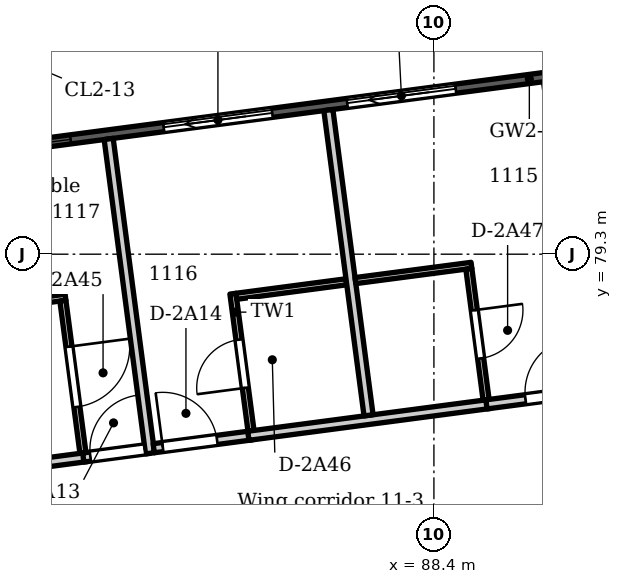
"""IFC4 building model, lengths in metres.
Left out: names, types, materials, properties, quantities, classifications, styles, units other than length and angle.
Written with IfcOpenShell. Run it as: python <this file> out.ifc"""

import sys

from ifc_helpers import new_model, si_unit, direction, frame, frame_2d, origin, place, context, subcontext, project, spatial, polyline, rectangle, outline, extrude, element, fill, save


model = new_model("IFC4")
c1 = context("Model", 3, precision=1e-05, world=origin(), true_north=direction((0.0, 1.0)))
c2 = subcontext(c1, "Body", "Model", "MODEL_VIEW")
j1 = project(units=[si_unit("LENGTHUNIT", "METRE"), si_unit("PLANEANGLEUNIT", "RADIAN")], contexts=[c1])
p1 = place(None, origin())
s1 = spatial("IfcSite", under=j1, at=p1, CompositionType="ELEMENT")
p2 = place(p1, origin())
s2 = spatial("IfcBuilding", under=s1, at=p2, CompositionType="ELEMENT")
p3 = place(p2, frame((0.0, 0.0, 50.4)))
s3 = spatial("IfcBuildingStorey", under=s2, at=p3, CompositionType="ELEMENT", Elevation=50.4)
p4 = place(p3, frame((54.142, 77.465, 0.0), z_axis=(0.0, 0.0, 1.0), x_axis=(0.991444696532, 0.130527444308, 0.0)))
e1 = element("IfcWall", 1, at=p4, inside=s3, PredefinedType="SOLIDWALL", context=c2, shape_type="SweptSolid", body=[
    extrude(outline(polyline([(0.149, 0.075), (0.149, -0.075), (47.217, -0.075), (47.217, 0.075), (0.149, 0.075)])), origin(), (0.0, 0.0, 1.0), 3.3),
])
p5 = place(p4, frame((1.222, 0.0, 0.0)))
e2 = element("IfcOpeningElement", 2, at=p5, cuts=e1, PredefinedType="OPENING", context=c2, shape_type="SweptSolid", body=[
    extrude(rectangle(XDim=1.8, YDim=2.6, at=frame_2d((0.9, 1.3))), frame((0.0, 0.085, 0.0), z_axis=(0.0, -1.0, 0.0), x_axis=(1.0, 0.0, 0.0)), (0.0, 0.0, 1.0), 0.17),
])
p6 = place(p4, frame((4.565, 0.0, 0.0)))
e3 = element("IfcOpeningElement", 3, at=p6, cuts=e1, PredefinedType="OPENING", context=c2, shape_type="SweptSolid", body=[
    extrude(rectangle(XDim=1.8, YDim=2.6, at=frame_2d((0.9, 1.3))), frame((0.0, 0.085, 0.0), z_axis=(0.0, -1.0, 0.0), x_axis=(1.0, 0.0, 0.0)), (0.0, 0.0, 1.0), 0.17),
])
p7 = place(p4, frame((8.209, 0.0, 0.0)))
e4 = element("IfcOpeningElement", 4, at=p7, cuts=e1, PredefinedType="OPENING", context=c2, shape_type="SweptSolid", body=[
    extrude(rectangle(XDim=1.8, YDim=2.6, at=frame_2d((0.9, 1.3))), frame((0.0, 0.085, 0.0), z_axis=(0.0, -1.0, 0.0), x_axis=(1.0, 0.0, 0.0)), (0.0, 0.0, 1.0), 0.17),
])
p8 = place(p4, frame((12.453, 0.0, 0.0)))
e5 = element("IfcOpeningElement", 5, at=p8, cuts=e1, PredefinedType="OPENING", context=c2, shape_type="SweptSolid", body=[
    extrude(rectangle(XDim=1.8, YDim=2.6, at=frame_2d((0.9, 1.3))), frame((0.0, 0.085, 0.0), z_axis=(0.0, -1.0, 0.0), x_axis=(1.0, 0.0, 0.0)), (0.0, 0.0, 1.0), 0.17),
])
p9 = place(p4, frame((15.496, 0.0, 0.0)))
e6 = element("IfcOpeningElement", 6, at=p9, cuts=e1, PredefinedType="OPENING", context=c2, shape_type="SweptSolid", body=[
    extrude(rectangle(XDim=1.8, YDim=2.6, at=frame_2d((0.9, 1.3))), frame((0.0, 0.085, 0.0), z_axis=(0.0, -1.0, 0.0), x_axis=(1.0, 0.0, 0.0)), (0.0, 0.0, 1.0), 0.17),
])
p10 = place(p4, frame((18.84, 0.0, 0.15)))
e7 = element("IfcOpeningElement", 7, at=p10, cuts=e1, PredefinedType="OPENING", context=c2, shape_type="SweptSolid", body=[
    extrude(rectangle(XDim=2.4, YDim=2.45, at=frame_2d((1.2, 1.225))), frame((0.0, 0.085, 0.0), z_axis=(0.0, -1.0, 0.0), x_axis=(1.0, 0.0, 0.0)), (0.0, 0.0, 1.0), 0.17),
])
p11 = place(p4, frame((22.783, 0.0, 0.0)))
e8 = element("IfcOpeningElement", 8, at=p11, cuts=e1, PredefinedType="OPENING", context=c2, shape_type="SweptSolid", body=[
    extrude(rectangle(XDim=1.8, YDim=2.6, at=frame_2d((0.9, 1.3))), frame((0.0, 0.085, 0.0), z_axis=(0.0, -1.0, 0.0), x_axis=(1.0, 0.0, 0.0)), (0.0, 0.0, 1.0), 0.17),
])
p12 = place(p4, frame((26.127, 0.0, 0.15)))
e9 = element("IfcOpeningElement", 9, at=p12, cuts=e1, PredefinedType="OPENING", context=c2, shape_type="SweptSolid", body=[
    extrude(rectangle(XDim=2.4, YDim=2.45, at=frame_2d((1.2, 1.225))), frame((0.0, 0.085, 0.0), z_axis=(0.0, -1.0, 0.0), x_axis=(1.0, 0.0, 0.0)), (0.0, 0.0, 1.0), 0.17),
])
p13 = place(p4, frame((30.071, 0.0, 0.0)))
e10 = element("IfcOpeningElement", 10, at=p13, cuts=e1, PredefinedType="OPENING", context=c2, shape_type="SweptSolid", body=[
    extrude(rectangle(XDim=1.8, YDim=2.6, at=frame_2d((0.9, 1.3))), frame((0.0, 0.085, 0.0), z_axis=(0.0, -1.0, 0.0), x_axis=(1.0, 0.0, 0.0)), (0.0, 0.0, 1.0), 0.17),
])
p14 = place(p4, frame((33.114, 0.0, 0.0)))
e11 = element("IfcOpeningElement", 11, at=p14, cuts=e1, PredefinedType="OPENING", context=c2, shape_type="SweptSolid", body=[
    extrude(rectangle(XDim=1.8, YDim=2.6, at=frame_2d((0.9, 1.3))), frame((0.0, 0.085, 0.0), z_axis=(0.0, -1.0, 0.0), x_axis=(1.0, 0.0, 0.0)), (0.0, 0.0, 1.0), 0.17),
])
p15 = place(p4, frame((37.358, 0.0, 0.0)))
e12 = element("IfcOpeningElement", 12, at=p15, cuts=e1, PredefinedType="OPENING", context=c2, shape_type="SweptSolid", body=[
    extrude(rectangle(XDim=1.8, YDim=2.6, at=frame_2d((0.9, 1.3))), frame((0.0, 0.085, 0.0), z_axis=(0.0, -1.0, 0.0), x_axis=(1.0, 0.0, 0.0)), (0.0, 0.0, 1.0), 0.17),
])
p16 = place(p4, frame((41.001, 0.0, 0.0)))
e13 = element("IfcOpeningElement", 13, at=p16, cuts=e1, PredefinedType="OPENING", context=c2, shape_type="SweptSolid", body=[
    extrude(rectangle(XDim=1.8, YDim=2.6, at=frame_2d((0.9, 1.3))), frame((0.0, 0.085, 0.0), z_axis=(0.0, -1.0, 0.0), x_axis=(1.0, 0.0, 0.0)), (0.0, 0.0, 1.0), 0.17),
])
p17 = place(p4, frame((44.345, 0.0, 0.0)))
e14 = element("IfcOpeningElement", 14, at=p17, cuts=e1, PredefinedType="OPENING", context=c2, shape_type="SweptSolid", body=[
    extrude(rectangle(XDim=1.8, YDim=2.6, at=frame_2d((0.9, 1.3))), frame((0.0, 0.085, 0.0), z_axis=(0.0, -1.0, 0.0), x_axis=(1.0, 0.0, 0.0)), (0.0, 0.0, 1.0), 0.17),
])
p18 = place(p3, frame((105.889, 77.411, 0.0), z_axis=(0.0, 0.0, 1.0), x_axis=(-0.38268395344, -0.923879316675, 0.0)))
e15 = element("IfcWall", 15, at=p18, inside=s3, PredefinedType="SOLIDWALL", context=c2, shape_type="SweptSolid", body=[
    extrude(outline(polyline([(0.149, 0.075), (0.149, -0.075), (47.217, -0.075), (47.217, 0.075), (0.149, 0.075)])), origin(), (0.0, 0.0, 1.0), 3.3),
])
p19 = place(p18, frame((1.222, 0.0, 0.0)))
e16 = element("IfcOpeningElement", 16, at=p19, cuts=e15, PredefinedType="OPENING", context=c2, shape_type="SweptSolid", body=[
    extrude(rectangle(XDim=1.8, YDim=2.6, at=frame_2d((0.9, 1.3))), frame((0.0, 0.085, 0.0), z_axis=(0.0, -1.0, 0.0), x_axis=(1.0, 0.0, 0.0)), (0.0, 0.0, 1.0), 0.17),
])
p20 = place(p18, frame((4.565, 0.0, 0.0)))
e17 = element("IfcOpeningElement", 17, at=p20, cuts=e15, PredefinedType="OPENING", context=c2, shape_type="SweptSolid", body=[
    extrude(rectangle(XDim=1.8, YDim=2.6, at=frame_2d((0.9, 1.3))), frame((0.0, 0.085, 0.0), z_axis=(0.0, -1.0, 0.0), x_axis=(1.0, 0.0, 0.0)), (0.0, 0.0, 1.0), 0.17),
])
p21 = place(p18, frame((8.209, 0.0, 0.0)))
e18 = element("IfcOpeningElement", 18, at=p21, cuts=e15, PredefinedType="OPENING", context=c2, shape_type="SweptSolid", body=[
    extrude(rectangle(XDim=1.8, YDim=2.6, at=frame_2d((0.9, 1.3))), frame((0.0, 0.085, 0.0), z_axis=(0.0, -1.0, 0.0), x_axis=(1.0, 0.0, 0.0)), (0.0, 0.0, 1.0), 0.17),
])
p22 = place(p18, frame((12.453, 0.0, 0.0)))
e19 = element("IfcOpeningElement", 19, at=p22, cuts=e15, PredefinedType="OPENING", context=c2, shape_type="SweptSolid", body=[
    extrude(rectangle(XDim=1.8, YDim=2.6, at=frame_2d((0.9, 1.3))), frame((0.0, 0.085, 0.0), z_axis=(0.0, -1.0, 0.0), x_axis=(1.0, 0.0, 0.0)), (0.0, 0.0, 1.0), 0.17),
])
p23 = place(p18, frame((15.496, 0.0, 0.0)))
e20 = element("IfcOpeningElement", 20, at=p23, cuts=e15, PredefinedType="OPENING", context=c2, shape_type="SweptSolid", body=[
    extrude(rectangle(XDim=1.8, YDim=2.6, at=frame_2d((0.9, 1.3))), frame((0.0, 0.085, 0.0), z_axis=(0.0, -1.0, 0.0), x_axis=(1.0, 0.0, 0.0)), (0.0, 0.0, 1.0), 0.17),
])
p24 = place(p18, frame((18.84, 0.0, 0.15)))
e21 = element("IfcOpeningElement", 21, at=p24, cuts=e15, PredefinedType="OPENING", context=c2, shape_type="SweptSolid", body=[
    extrude(rectangle(XDim=2.4, YDim=2.45, at=frame_2d((1.2, 1.225))), frame((0.0, 0.085, 0.0), z_axis=(0.0, -1.0, 0.0), x_axis=(1.0, 0.0, 0.0)), (0.0, 0.0, 1.0), 0.17),
])
p25 = place(p18, frame((22.783, 0.0, 0.0)))
e22 = element("IfcOpeningElement", 22, at=p25, cuts=e15, PredefinedType="OPENING", context=c2, shape_type="SweptSolid", body=[
    extrude(rectangle(XDim=1.8, YDim=2.6, at=frame_2d((0.9, 1.3))), frame((0.0, 0.085, 0.0), z_axis=(0.0, -1.0, 0.0), x_axis=(1.0, 0.0, 0.0)), (0.0, 0.0, 1.0), 0.17),
])
p26 = place(p18, frame((26.127, 0.0, 0.15)))
e23 = element("IfcOpeningElement", 23, at=p26, cuts=e15, PredefinedType="OPENING", context=c2, shape_type="SweptSolid", body=[
    extrude(rectangle(XDim=2.4, YDim=2.45, at=frame_2d((1.2, 1.225))), frame((0.0, 0.085, 0.0), z_axis=(0.0, -1.0, 0.0), x_axis=(1.0, 0.0, 0.0)), (0.0, 0.0, 1.0), 0.17),
])
p27 = place(p18, frame((30.071, 0.0, 0.0)))
e24 = element("IfcOpeningElement", 24, at=p27, cuts=e15, PredefinedType="OPENING", context=c2, shape_type="SweptSolid", body=[
    extrude(rectangle(XDim=1.8, YDim=2.6, at=frame_2d((0.9, 1.3))), frame((0.0, 0.085, 0.0), z_axis=(0.0, -1.0, 0.0), x_axis=(1.0, 0.0, 0.0)), (0.0, 0.0, 1.0), 0.17),
])
p28 = place(p18, frame((33.114, 0.0, 0.0)))
e25 = element("IfcOpeningElement", 25, at=p28, cuts=e15, PredefinedType="OPENING", context=c2, shape_type="SweptSolid", body=[
    extrude(rectangle(XDim=1.8, YDim=2.6, at=frame_2d((0.9, 1.3))), frame((0.0, 0.085, 0.0), z_axis=(0.0, -1.0, 0.0), x_axis=(1.0, 0.0, 0.0)), (0.0, 0.0, 1.0), 0.17),
])
p29 = place(p18, frame((37.358, 0.0, 0.0)))
e26 = element("IfcOpeningElement", 26, at=p29, cuts=e15, PredefinedType="OPENING", context=c2, shape_type="SweptSolid", body=[
    extrude(rectangle(XDim=1.8, YDim=2.6, at=frame_2d((0.9, 1.3))), frame((0.0, 0.085, 0.0), z_axis=(0.0, -1.0, 0.0), x_axis=(1.0, 0.0, 0.0)), (0.0, 0.0, 1.0), 0.17),
])
p30 = place(p18, frame((41.001, 0.0, 0.0)))
e27 = element("IfcOpeningElement", 27, at=p30, cuts=e15, PredefinedType="OPENING", context=c2, shape_type="SweptSolid", body=[
    extrude(rectangle(XDim=1.8, YDim=2.6, at=frame_2d((0.9, 1.3))), frame((0.0, 0.085, 0.0), z_axis=(0.0, -1.0, 0.0), x_axis=(1.0, 0.0, 0.0)), (0.0, 0.0, 1.0), 0.17),
])
p31 = place(p18, frame((44.345, 0.0, 0.0)))
e28 = element("IfcOpeningElement", 28, at=p31, cuts=e15, PredefinedType="OPENING", context=c2, shape_type="SweptSolid", body=[
    extrude(rectangle(XDim=1.8, YDim=2.6, at=frame_2d((0.9, 1.3))), frame((0.0, 0.085, 0.0), z_axis=(0.0, -1.0, 0.0), x_axis=(1.0, 0.0, 0.0)), (0.0, 0.0, 1.0), 0.17),
])
p32 = place(p3, frame((79.838, 78.262, 0.0), z_axis=(0.0, 0.0, 1.0), x_axis=(0.991430252683, 0.130637108298, 0.0)))
e29 = element("IfcWall", 29, at=p32, inside=s3, PredefinedType="PARTITIONING", context=c2, shape_type="SweptSolid", body=[
    extrude(rectangle(XDim=2.525, YDim=0.1, at=frame_2d((1.262, 0.0))), origin(), (0.0, 0.0, 1.0), 3.3),
])
p33 = place(p3, frame((80.106, 75.623, 0.0), z_axis=(0.0, 0.0, 1.0), x_axis=(0.991448878041, 0.130495678972, 0.0)))
e30 = element("IfcWall", 30, at=p33, inside=s3, PredefinedType="PARTITIONING", context=c2, shape_type="SweptSolid", body=[
    extrude(rectangle(XDim=2.608, YDim=0.15, at=frame_2d((1.304, 0.0))), origin(), (0.0, 0.0, 1.0), 3.3),
])
p34 = place(p3, frame((82.299, 78.535, 0.0), z_axis=(0.0, 0.0, 1.0), x_axis=(0.130504525485, -0.991447713613, 0.0)))
e31 = element("IfcWall", 31, at=p34, inside=s3, PredefinedType="PARTITIONING", context=c2, shape_type="SweptSolid", body=[
    extrude(rectangle(XDim=2.525, YDim=0.1, at=frame_2d((1.263, 0.0))), origin(), (0.0, 0.0, 1.0), 3.3),
])
p35 = place(p34, frame((0.763, 0.0, 0.0)))
e32 = element("IfcOpeningElement", 32, at=p35, cuts=e31, PredefinedType="OPENING", context=c2, shape_type="SweptSolid", body=[
    extrude(rectangle(XDim=1.0, YDim=2.1, at=frame_2d((0.5, 1.05))), frame((0.0, 0.06, 0.0), z_axis=(0.0, -1.0, 0.0), x_axis=(1.0, 0.0, 0.0)), (0.0, 0.0, 1.0), 0.12),
])
p36 = place(p3, frame((82.634, 75.956, 0.0), z_axis=(0.0, 0.0, 1.0), x_axis=(0.99141275319, 0.130769846721, 0.0)))
e33 = element("IfcWall", 33, at=p36, inside=s3, PredefinedType="PARTITIONING", context=c2, shape_type="SweptSolid", body=[
    extrude(rectangle(XDim=1.102, YDim=0.15, at=frame_2d((0.551, 0.0))), origin(), (0.0, 0.0, 1.0), 3.3),
])
p37 = place(p36, frame((0.117, 0.0, 0.0)))
e34 = element("IfcOpeningElement", 34, at=p37, cuts=e33, PredefinedType="OPENING", context=c2, shape_type="SweptSolid", body=[
    extrude(rectangle(XDim=0.9, YDim=2.1, at=frame_2d((0.45, 1.05))), frame((0.0, 0.085, 0.0), z_axis=(0.0, -1.0, 0.0), x_axis=(1.0, 0.0, 0.0)), (0.0, 0.0, 1.0), 0.17),
])
p38 = place(p3, frame((83.051, 81.195, 0.0), z_axis=(0.0, 0.0, 1.0), x_axis=(0.130492059077, -0.99144935449, 0.0)))
e35 = element("IfcWall", 35, at=p38, inside=s3, PredefinedType="PARTITIONING", context=c2, shape_type="SweptSolid", body=[
    extrude(rectangle(XDim=5.214, YDim=0.15, at=frame_2d((2.607, 0.0))), origin(), (0.0, 0.0, 1.0), 3.3),
])
p39 = place(p3, frame((83.792, 76.109, 0.0), z_axis=(0.0, 0.0, 1.0), x_axis=(0.991466035582, 0.130365257213, 0.0)))
e36 = element("IfcWall", 36, at=p39, inside=s3, PredefinedType="PARTITIONING", context=c2, shape_type="SweptSolid", body=[
    extrude(rectangle(XDim=1.627, YDim=0.15, at=frame_2d((0.814, 0.0))), origin(), (0.0, 0.0, 1.0), 3.3),
])
p40 = place(p39, frame((0.15, 0.0, 0.0)))
e37 = element("IfcOpeningElement", 37, at=p40, cuts=e36, PredefinedType="OPENING", context=c2, shape_type="SweptSolid", body=[
    extrude(rectangle(XDim=0.9, YDim=2.1, at=frame_2d((0.45, 1.05))), frame((0.0, 0.085, 0.0), z_axis=(0.0, -1.0, 0.0), x_axis=(1.0, 0.0, 0.0)), (0.0, 0.0, 1.0), 0.17),
])
p41 = place(p3, frame((85.094, 78.651, 0.0), z_axis=(0.0, 0.0, 1.0), x_axis=(0.13083486939, -0.991404174367, 0.0)))
e38 = element("IfcWall", 38, at=p41, inside=s3, PredefinedType="PARTITIONING", context=c2, shape_type="SweptSolid", body=[
    extrude(rectangle(XDim=2.275, YDim=0.1, at=frame_2d((1.137, 0.0))), origin(), (0.0, 0.0, 1.0), 3.3),
])
p42 = place(p41, frame((0.762, 0.0, 0.0)))
e39 = element("IfcOpeningElement", 39, at=p42, cuts=e38, PredefinedType="OPENING", context=c2, shape_type="SweptSolid", body=[
    extrude(rectangle(XDim=0.8, YDim=2.1, at=frame_2d((0.4, 1.05))), frame((0.0, 0.06, 0.0), z_axis=(0.0, -1.0, 0.0), x_axis=(1.0, 0.0, 0.0)), (0.0, 0.0, 1.0), 0.12),
])
p43 = place(p3, frame((85.151, 78.607, 0.0), z_axis=(0.0, 0.0, 1.0), x_axis=(0.991411458615, 0.130779660983, 0.0)))
e40 = element("IfcWall", 40, at=p43, inside=s3, PredefinedType="PARTITIONING", context=c2, shape_type="SweptSolid", body=[
    extrude(rectangle(XDim=1.826, YDim=0.1, at=frame_2d((0.913, 0.0))), origin(), (0.0, 0.0, 1.0), 3.3),
])
p44 = place(p3, frame((85.238, 74.409, 0.0), z_axis=(0.0, 0.0, 1.0), x_axis=(0.991440693098, 0.130557849512, 0.0)))
e41 = element("IfcWall", 41, at=p44, inside=s3, PredefinedType="PARTITIONING", context=c2, shape_type="SweptSolid", body=[
    extrude(rectangle(XDim=5.378, YDim=0.15, at=frame_2d((2.689, 0.0))), origin(), (0.0, 0.0, 1.0), 3.3),
])
p45 = place(p3, frame((85.348, 76.313, 0.0), z_axis=(0.0, 0.0, 1.0), x_axis=(0.99141734702, 0.130735014545, 0.0)))
e42 = element("IfcWall", 42, at=p45, inside=s3, PredefinedType="PARTITIONING", context=c2, shape_type="SweptSolid", body=[
    extrude(rectangle(XDim=4.008, YDim=0.15, at=frame_2d((2.004, 0.0))), origin(), (0.0, 0.0, 1.0), 3.3),
])
p46 = place(p3, frame((86.664, 81.67, 0.0), z_axis=(0.0, 0.0, 1.0), x_axis=(0.130524360114, -0.991445102573, 0.0)))
e43 = element("IfcWall", 43, at=p46, inside=s3, PredefinedType="PARTITIONING", context=c2, shape_type="SweptSolid", body=[
    extrude(rectangle(XDim=5.063, YDim=0.15, at=frame_2d((2.532, 0.0))), origin(), (0.0, 0.0, 1.0), 3.3),
])
p47 = place(p3, frame((87.109, 78.866, 0.0), z_axis=(0.0, 0.0, 1.0), x_axis=(0.991477594971, 0.130277314488, 0.0)))
e44 = element("IfcWall", 44, at=p47, inside=s3, PredefinedType="PARTITIONING", context=c2, shape_type="SweptSolid", body=[
    extrude(rectangle(XDim=1.925, YDim=0.1, at=frame_2d((0.962, 0.0))), origin(), (0.0, 0.0, 1.0), 3.3),
])
p48 = place(p3, frame((88.975, 79.06, 0.0), z_axis=(0.0, 0.0, 1.0), x_axis=(0.130457416757, -0.991453913409, 0.0)))
e45 = element("IfcWall", 45, at=p48, inside=s3, PredefinedType="PARTITIONING", context=c2, shape_type="SweptSolid", body=[
    extrude(rectangle(XDim=2.175, YDim=0.1, at=frame_2d((1.087, 0.0))), origin(), (0.0, 0.0, 1.0), 3.3),
])
p49 = place(p48, frame((0.687, 0.0, 0.0)))
e46 = element("IfcOpeningElement", 46, at=p49, cuts=e45, PredefinedType="OPENING", context=c2, shape_type="SweptSolid", body=[
    extrude(rectangle(XDim=0.8, YDim=2.1, at=frame_2d((0.4, 1.05))), frame((0.0, 0.06, 0.0), z_axis=(0.0, -1.0, 0.0), x_axis=(1.0, 0.0, 0.0)), (0.0, 0.0, 1.0), 0.12),
])
p50 = place(p3, frame((89.264, 76.83, 0.0), z_axis=(0.0, 0.0, 1.0), x_axis=(0.991460374844, 0.130408301556, 0.0)))
e47 = element("IfcWall", 47, at=p50, inside=s3, PredefinedType="PARTITIONING", context=c2, shape_type="SweptSolid", body=[
    extrude(rectangle(XDim=1.777, YDim=0.15, at=frame_2d((0.888, 0.0))), origin(), (0.0, 0.0, 1.0), 3.3),
])
p51 = place(p50, frame((0.647, 0.0, 0.0)))
e48 = element("IfcOpeningElement", 48, at=p51, cuts=e47, PredefinedType="OPENING", context=c2, shape_type="SweptSolid", body=[
    extrude(rectangle(XDim=0.9, YDim=2.1, at=frame_2d((0.45, 1.05))), frame((0.0, 0.085, 0.0), z_axis=(0.0, -1.0, 0.0), x_axis=(1.0, 0.0, 0.0)), (0.0, 0.0, 1.0), 0.17),
])
p52 = place(p12, origin())
e49 = element("IfcWindow", 49, at=p52, inside=s3, PartitioningType="SINGLE_PANEL", PredefinedType="WINDOW", context=c2, shape_type="SweptSolid", body=[
    extrude(rectangle(XDim=2.4, YDim=2.45, at=frame_2d((1.2, 1.225))), frame((0.0, 0.03, 0.0), z_axis=(0.0, -1.0, 0.0), x_axis=(1.0, 0.0, 0.0)), (0.0, 0.0, 1.0), 0.06),
])
fill(e9, e49)
p53 = place(p13, origin())
e50 = element("IfcDoor", 50, at=p53, inside=s3, OperationType="SLIDING_TO_LEFT", PredefinedType="DOOR", context=c2, shape_type="SweptSolid", body=[
    extrude(rectangle(XDim=1.8, YDim=2.6, at=frame_2d((0.9, 1.3))), frame((0.0, 0.025, 0.0), z_axis=(0.0, -1.0, 0.0), x_axis=(1.0, 0.0, 0.0)), (0.0, 0.0, 1.0), 0.05),
])
fill(e10, e50)
p54 = place(p14, origin())
e51 = element("IfcDoor", 51, at=p54, inside=s3, OperationType="SLIDING_TO_LEFT", PredefinedType="DOOR", context=c2, shape_type="SweptSolid", body=[
    extrude(rectangle(XDim=1.8, YDim=2.6, at=frame_2d((0.9, 1.3))), frame((0.0, 0.025, 0.0), z_axis=(0.0, -1.0, 0.0), x_axis=(1.0, 0.0, 0.0)), (0.0, 0.0, 1.0), 0.05),
])
fill(e11, e51)
p55 = place(p37, origin())
e52 = element("IfcDoor", 52, at=p55, inside=s3, OperationType="SINGLE_SWING_RIGHT", PredefinedType="DOOR", context=c2, shape_type="SweptSolid", body=[
    extrude(rectangle(XDim=0.9, YDim=2.1, at=frame_2d((0.45, 1.05))), frame((0.0, 0.025, 0.0), z_axis=(0.0, -1.0, 0.0), x_axis=(1.0, 0.0, 0.0)), (0.0, 0.0, 1.0), 0.05),
])
fill(e34, e52)
p56 = place(p40, origin())
e53 = element("IfcDoor", 53, at=p56, inside=s3, OperationType="SINGLE_SWING_LEFT", PredefinedType="DOOR", context=c2, shape_type="SweptSolid", body=[
    extrude(rectangle(XDim=0.9, YDim=2.1, at=frame_2d((0.45, 1.05))), frame((0.0, 0.025, 0.0), z_axis=(0.0, -1.0, 0.0), x_axis=(1.0, 0.0, 0.0)), (0.0, 0.0, 1.0), 0.05),
])
fill(e37, e53)
p57 = place(p51, origin())
e54 = element("IfcDoor", 54, at=p57, inside=s3, OperationType="SINGLE_SWING_RIGHT", PredefinedType="DOOR", context=c2, shape_type="SweptSolid", body=[
    extrude(rectangle(XDim=0.9, YDim=2.1, at=frame_2d((0.45, 1.05))), frame((0.0, 0.025, 0.0), z_axis=(0.0, -1.0, 0.0), x_axis=(1.0, 0.0, 0.0)), (0.0, 0.0, 1.0), 0.05),
])
fill(e48, e54)
p58 = place(p35, origin())
e55 = element("IfcDoor", 55, at=p58, inside=s3, OperationType="SINGLE_SWING_LEFT", PredefinedType="DOOR", context=c2, shape_type="SweptSolid", body=[
    extrude(rectangle(XDim=1.0, YDim=2.1, at=frame_2d((0.5, 1.05))), frame((0.0, 0.025, 0.0), z_axis=(0.0, -1.0, 0.0), x_axis=(1.0, 0.0, 0.0)), (0.0, 0.0, 1.0), 0.05),
])
fill(e32, e55)
p59 = place(p42, frame((0.8, 0.0, 0.0), z_axis=(0.0, 0.0, 1.0), x_axis=(-1.0, 0.0, 0.0)))
e56 = element("IfcDoor", 56, at=p59, inside=s3, OperationType="SINGLE_SWING_LEFT", PredefinedType="DOOR", context=c2, shape_type="SweptSolid", body=[
    extrude(rectangle(XDim=0.8, YDim=2.1, at=frame_2d((0.4, 1.05))), frame((0.0, 0.025, 0.0), z_axis=(0.0, -1.0, 0.0), x_axis=(1.0, 0.0, 0.0)), (0.0, 0.0, 1.0), 0.05),
])
fill(e39, e56)
p60 = place(p49, origin())
e57 = element("IfcDoor", 57, at=p60, inside=s3, OperationType="SINGLE_SWING_LEFT", PredefinedType="DOOR", context=c2, shape_type="SweptSolid", body=[
    extrude(rectangle(XDim=0.8, YDim=2.1, at=frame_2d((0.4, 1.05))), frame((0.0, 0.025, 0.0), z_axis=(0.0, -1.0, 0.0), x_axis=(1.0, 0.0, 0.0)), (0.0, 0.0, 1.0), 0.05),
])
fill(e46, e57)
save(model, sys.argv[1])
